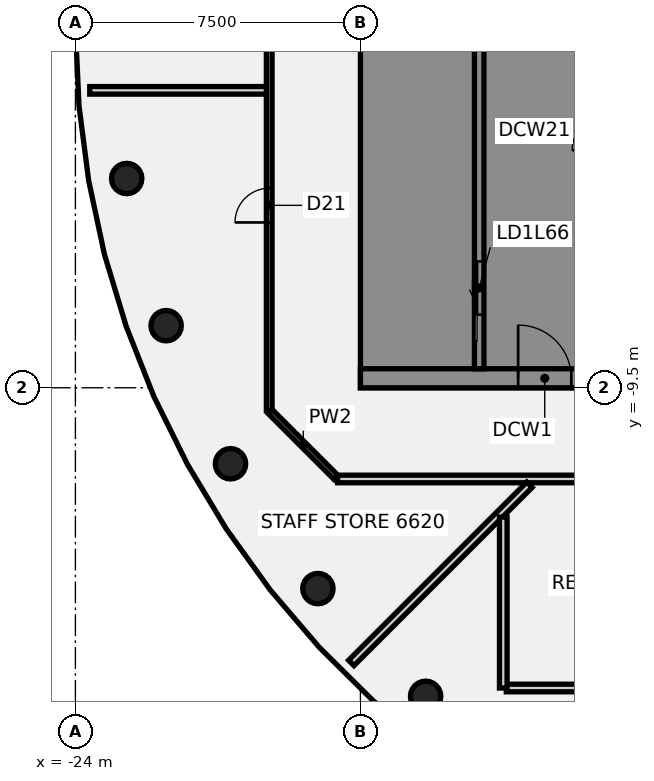
"""IFC4 building model, lengths in metres.
Left out: names, types, materials, properties, quantities, classifications, styles, units other than length and angle.
Written with IfcOpenShell. Run it as: python <this file> out.ifc"""

import sys

from ifc_helpers import new_model, si_unit, direction, frame, frame_2d, origin, origin_2d, place, context, subcontext, project, spatial, polyline, rectangle, circle, outline, extrude, element, fill, save


model = new_model("IFC4")
c1 = context("Model", 3, precision=1e-05, world=origin(), true_north=direction((0.0, 1.0)))
c2 = subcontext(c1, "Body", "Model", "MODEL_VIEW")
j1 = project(units=[si_unit("LENGTHUNIT", "METRE"), si_unit("PLANEANGLEUNIT", "RADIAN")], contexts=[c1])
p1 = place(None, origin())
s1 = spatial("IfcSite", under=j1, at=p1, CompositionType="ELEMENT")
p2 = place(p1, origin())
s2 = spatial("IfcBuilding", under=s1, at=p2, CompositionType="ELEMENT")
p3 = place(p2, frame((0.0, 0.0, 260.4)))
s3 = spatial("IfcBuildingStorey", under=s2, at=p3, CompositionType="ELEMENT", Elevation=260.4)
for number, where, z_axis, x_axis in (
    (1, (-22.651, -3.994, -0.14), (0.0, 0.0, 1.0), (1.0, 0.0, 0.0)),
    (2, (-21.613, -7.866, -0.14), (0.0, 0.0, 1.0), (1.0, 0.0, 0.0)),
    (3, (-19.919, -11.5, -0.14), (0.0, 0.0, 1.0), (1.0, 0.0, 0.0)),
    (4, (-17.619, -14.784, -0.14), (0.0, 0.0, 1.0), (1.0, 0.0, 0.0)),
    (5, (-14.784, -17.619, -0.14), (0.0, 0.0, 1.0), (1.0, 0.0, 0.0)),
):
    element("IfcColumn", number, at=place(p3, frame(where, z_axis=z_axis, x_axis=x_axis)), inside=s3, PredefinedType="COLUMN", context=c2, shape_type="SweptSolid", body=[
        extrude(circle(Radius=0.4, at=origin_2d()), origin(), (0.0, 0.0, 1.0), 3.6),
    ])
p4 = place(p3, frame((-18.872, -10.128, 0.0), z_axis=(0.0, 0.0, 1.0), x_axis=(0.707106781187, -0.707106781187, 0.0)))
e6 = element("IfcWall", 6, at=p4, inside=s3, PredefinedType="PARTITIONING", context=c2, shape_type="SweptSolid", body=[
    extrude(rectangle(XDim=2.455, YDim=0.15, at=frame_2d((1.228, 0.0))), origin(), (0.0, 0.0, 1.0), 2.864),
])
p5 = place(p3, frame((-23.623, -1.674, 0.0), z_axis=(0.0, 0.0, 1.0), x_axis=(1.0, 0.0, 0.0)))
e7 = element("IfcWall", 7, at=p5, inside=s3, PredefinedType="PARTITIONING", context=c2, shape_type="SweptSolid", body=[
    extrude(rectangle(XDim=4.668, YDim=0.2, at=frame_2d((2.334, 0.0))), origin(), (0.0, 0.0, 1.0), 2.864),
])
p6 = place(p3, frame((-17.1, -11.9, 0.0), z_axis=(0.0, 0.0, 1.0), x_axis=(1.0, 0.0, 0.0)))
e8 = element("IfcWall", 8, at=p6, inside=s3, PredefinedType="PARTITIONING", context=c2, shape_type="SweptSolid", body=[
    extrude(rectangle(XDim=34.165, YDim=0.2, at=frame_2d((17.083, 0.0))), origin(), (0.0, 0.0, 1.0), 2.864),
])
p7 = place(p6, frame((7.75, 0.0, 0.0)))
e9 = element("IfcOpeningElement", 9, at=p7, cuts=e8, PredefinedType="OPENING", context=c2, shape_type="SweptSolid", body=[
    extrude(rectangle(XDim=0.9, YDim=2.1, at=frame_2d((0.45, 1.05))), frame((0.0, 0.11, 0.0), z_axis=(0.0, -1.0, 0.0), x_axis=(1.0, 0.0, 0.0)), (0.0, 0.0, 1.0), 0.22),
])
p8 = place(p6, frame((27.541, 0.0, 0.0)))
e10 = element("IfcOpeningElement", 10, at=p8, cuts=e8, PredefinedType="OPENING", context=c2, shape_type="SweptSolid", body=[
    extrude(rectangle(XDim=0.9, YDim=2.1, at=frame_2d((0.45, 1.05))), frame((0.0, 0.11, 0.0), z_axis=(0.0, -1.0, 0.0), x_axis=(1.0, 0.0, 0.0)), (0.0, 0.0, 1.0), 0.22),
])
p9 = place(p6, frame((16.809, 0.0, 0.0)))
e11 = element("IfcOpeningElement", 11, at=p9, cuts=e8, PredefinedType="OPENING", context=c2, shape_type="SweptSolid", body=[
    extrude(rectangle(XDim=1.8, YDim=2.1, at=frame_2d((0.9, 1.05))), frame((0.0, 0.11, 0.0), z_axis=(0.0, -1.0, 0.0), x_axis=(1.0, 0.0, 0.0)), (0.0, 0.0, 1.0), 0.22),
])
p10 = place(p6, frame((24.222, 0.0, 0.0)))
e12 = element("IfcOpeningElement", 12, at=p10, cuts=e8, PredefinedType="OPENING", context=c2, shape_type="SweptSolid", body=[
    extrude(rectangle(XDim=0.9, YDim=2.1, at=frame_2d((0.45, 1.05))), frame((0.0, 0.11, 0.0), z_axis=(0.0, -1.0, 0.0), x_axis=(1.0, 0.0, 0.0)), (0.0, 0.0, 1.0), 0.22),
])
p11 = place(p6, frame((30.5, 0.0, 0.0)))
e13 = element("IfcOpeningElement", 13, at=p11, cuts=e8, PredefinedType="OPENING", context=c2, shape_type="SweptSolid", body=[
    extrude(rectangle(XDim=0.9, YDim=2.1, at=frame_2d((0.45, 1.05))), frame((0.0, 0.11, 0.0), z_axis=(0.0, -1.0, 0.0), x_axis=(1.0, 0.0, 0.0)), (0.0, 0.0, 1.0), 0.22),
])
p12 = place(p3, frame((-12.661, -17.4, 0.0), z_axis=(0.0, 0.0, 1.0), x_axis=(1.0, 0.0, 0.0)))
e14 = element("IfcWall", 14, at=p12, inside=s3, PredefinedType="PARTITIONING", context=c2, shape_type="SweptSolid", body=[
    extrude(rectangle(XDim=8.835, YDim=0.2, at=frame_2d((4.417, 0.0))), origin(), (0.0, 0.0, 1.0), 2.864),
])
p13 = place(p3, frame((-16.74, -16.74, 0.0), z_axis=(0.0, 0.0, 1.0), x_axis=(0.707106781187, 0.707106781187, 0.0)))
e15 = element("IfcWall", 15, at=p13, inside=s3, PredefinedType="PARTITIONING", context=c2, shape_type="SweptSolid", body=[
    extrude(rectangle(XDim=6.631, YDim=0.2, at=frame_2d((3.315, 0.0))), origin(), (0.0, 0.0, 1.0), 2.864),
])
p14 = place(p3, frame((-18.9, -10.1, 0.0), z_axis=(0.0, 0.0, 1.0), x_axis=(0.0, 1.0, 0.0)))
e16 = element("IfcWall", 16, at=p14, inside=s3, PredefinedType="PARTITIONING", context=c2, shape_type="SweptSolid", body=[
    extrude(rectangle(XDim=20.2, YDim=0.15, at=frame_2d((10.1, 0.0))), origin(), (0.0, 0.0, 1.0), 2.864),
])
p15 = place(p14, frame((4.95, 0.0, 0.0)))
e17 = element("IfcOpeningElement", 17, at=p15, cuts=e16, PredefinedType="OPENING", context=c2, shape_type="SweptSolid", body=[
    extrude(rectangle(XDim=0.9, YDim=2.1, at=frame_2d((0.45, 1.05))), frame((0.0, 0.085, 0.0), z_axis=(0.0, -1.0, 0.0), x_axis=(1.0, 0.0, 0.0)), (0.0, 0.0, 1.0), 0.17),
])
p16 = place(p14, frame((12.176, 0.0, 0.0)))
e18 = element("IfcOpeningElement", 18, at=p16, cuts=e16, PredefinedType="OPENING", context=c2, shape_type="SweptSolid", body=[
    extrude(rectangle(XDim=0.9, YDim=2.1, at=frame_2d((0.45, 1.05))), frame((0.0, 0.085, 0.0), z_axis=(0.0, -1.0, 0.0), x_axis=(1.0, 0.0, 0.0)), (0.0, 0.0, 1.0), 0.17),
])
p17 = place(p3, frame((-12.741, -17.4, 0.0), z_axis=(0.0, 0.0, 1.0), x_axis=(0.0, 1.0, 0.0)))
e19 = element("IfcWall", 19, at=p17, inside=s3, PredefinedType="PARTITIONING", context=c2, shape_type="SweptSolid", body=[
    extrude(rectangle(XDim=4.499, YDim=0.2, at=frame_2d((2.25, 0.0))), origin(), (0.0, 0.0, 1.0), 2.864),
])
p18 = place(p3, frame((-16.5, -9.25, 0.0), z_axis=(0.0, 0.0, 1.0), x_axis=(1.0, 0.0, 0.0)))
e20 = element("IfcWall", 20, at=p18, inside=s3, PredefinedType="SHEAR", context=c2, shape_type="SweptSolid", body=[
    extrude(rectangle(XDim=13.0, YDim=0.5, at=frame_2d((6.5, 0.0))), origin(), (0.0, 0.0, 1.0), 3.46),
])
p19 = place(p18, frame((4.15, 0.0, 0.0)))
e21 = element("IfcOpeningElement", 21, at=p19, cuts=e20, PredefinedType="OPENING", context=c2, shape_type="SweptSolid", body=[
    extrude(rectangle(XDim=1.4, YDim=2.1, at=frame_2d((0.7, 1.05))), frame((0.0, 0.26, 0.0), z_axis=(0.0, -1.0, 0.0), x_axis=(1.0, 0.0, 0.0)), (0.0, 0.0, 1.0), 0.52),
])
p20 = place(p18, frame((10.125, 0.0, 0.0)))
e22 = element("IfcOpeningElement", 22, at=p20, cuts=e20, PredefinedType="OPENING", context=c2, shape_type="SweptSolid", body=[
    extrude(rectangle(XDim=1.4, YDim=2.1, at=frame_2d((0.7, 1.05))), frame((0.0, 0.26, 0.0), z_axis=(0.0, -1.0, 0.0), x_axis=(1.0, 0.0, 0.0)), (0.0, 0.0, 1.0), 0.52),
])
p21 = place(p3, origin())
e23 = element("IfcWall", 23, at=p21, inside=s3, PredefinedType="SHEAR", context=c2, shape_type="SweptSolid", body=[
    extrude(outline(polyline([(-13.5, -8.125), (-16.0, -8.125), (-16.0, -5.625), (-13.5, -5.625), (-13.5, -5.375), (-16.0, -5.375), (-16.0, 5.375), (-13.5, 5.375), (-13.5, 5.625), (-16.0, 5.625), (-16.0, 8.125), (-13.5, 8.125), (-13.5, 9.0), (-16.0, 9.0), (-16.5, 9.0), (-16.5, -9.0), (-16.0, -9.0), (-13.5, -9.0), (-13.5, -8.125)])), origin(), (0.0, 0.0, 1.0), 3.46),
])
p22 = place(p3, frame((-13.375, -9.0, 0.0), z_axis=(0.0, 0.0, 1.0), x_axis=(0.0, 1.0, 0.0)))
e24 = element("IfcWall", 24, at=p22, inside=s3, PredefinedType="SHEAR", context=c2, shape_type="SweptSolid", body=[
    extrude(rectangle(XDim=18.0, YDim=0.25, at=frame_2d((9.0, 0.0))), origin(), (0.0, 0.0, 1.0), 3.46),
])
p23 = place(p22, frame((1.425, 0.0, 0.0)))
e25 = element("IfcOpeningElement", 25, at=p23, cuts=e24, PredefinedType="OPENING", context=c2, shape_type="SweptSolid", body=[
    extrude(rectangle(XDim=1.4, YDim=2.1, at=frame_2d((0.7, 1.05))), frame((0.0, 0.135, 0.0), z_axis=(0.0, -1.0, 0.0), x_axis=(1.0, 0.0, 0.0)), (0.0, 0.0, 1.0), 0.27),
])
p24 = place(p22, frame((8.5, 0.0, 0.0)))
e26 = element("IfcOpeningElement", 26, at=p24, cuts=e24, PredefinedType="OPENING", context=c2, shape_type="SweptSolid", body=[
    extrude(rectangle(XDim=1.0, YDim=2.1, at=frame_2d((0.5, 1.05))), frame((0.0, 0.135, 0.0), z_axis=(0.0, -1.0, 0.0), x_axis=(1.0, 0.0, 0.0)), (0.0, 0.0, 1.0), 0.27),
])
p25 = place(p15, origin())
e27 = element("IfcDoor", 27, at=p25, inside=s3, OperationType="SINGLE_SWING_RIGHT", PredefinedType="DOOR", context=c2, shape_type="SweptSolid", body=[
    extrude(rectangle(XDim=0.9, YDim=2.1, at=frame_2d((0.45, 1.05))), frame((0.0, 0.025, 0.0), z_axis=(0.0, -1.0, 0.0), x_axis=(1.0, 0.0, 0.0)), (0.0, 0.0, 1.0), 0.05),
])
fill(e17, e27)
p26 = place(p19, origin())
e28 = element("IfcDoor", 28, at=p26, inside=s3, OperationType="SINGLE_SWING_LEFT", PredefinedType="DOOR", context=c2, shape_type="SweptSolid", body=[
    extrude(rectangle(XDim=1.4, YDim=2.1, at=frame_2d((0.7, 1.05))), frame((0.0, 0.025, 0.0), z_axis=(0.0, -1.0, 0.0), x_axis=(1.0, 0.0, 0.0)), (0.0, 0.0, 1.0), 0.05),
])
fill(e21, e28)
p27 = place(p23, origin())
e29 = element("IfcDoor", 29, at=p27, inside=s3, OperationType="SLIDING_TO_LEFT", PredefinedType="DOOR", context=c2, shape_type="SweptSolid", body=[
    extrude(rectangle(XDim=1.4, YDim=2.1, at=frame_2d((0.7, 1.05))), frame((0.0, 0.025, 0.0), z_axis=(0.0, -1.0, 0.0), x_axis=(1.0, 0.0, 0.0)), (0.0, 0.0, 1.0), 0.05),
])
fill(e25, e29)
save(model, sys.argv[1])
